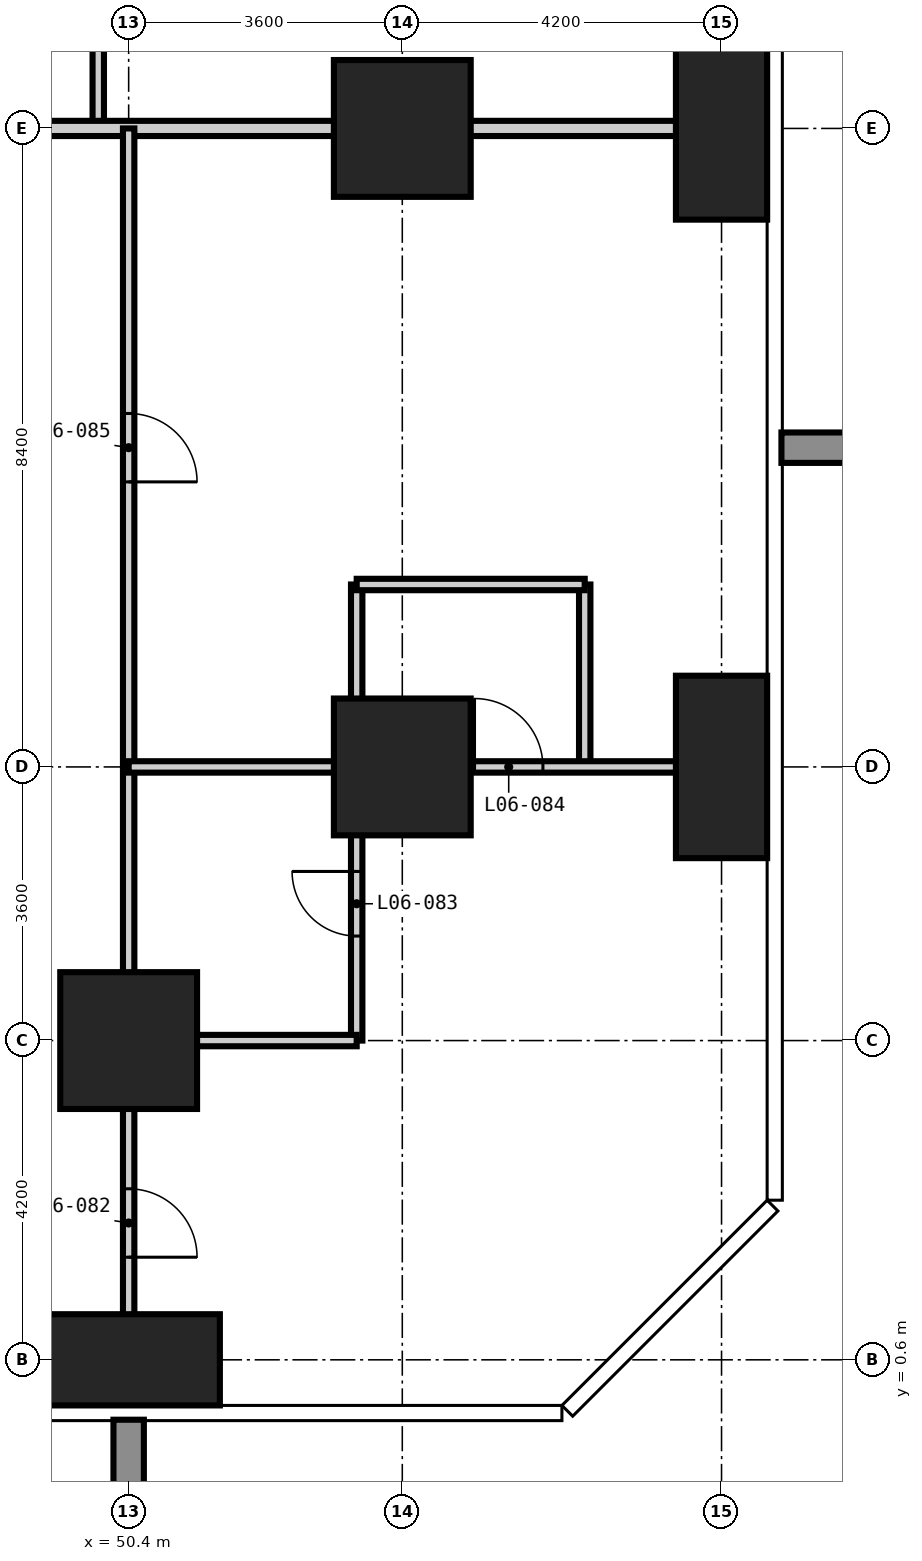
"""IFC4 building model, lengths in metres.
Left out: names, types, materials, properties, quantities, classifications, styles, units other than length and angle.
Written with IfcOpenShell. Run it as: python <this file> out.ifc"""

import sys

from ifc_helpers import new_model, si_unit, direction, frame, frame_2d, origin, origin_2d, place, context, subcontext, project, spatial, rectangle, extrude, element, fill, save


model = new_model("IFC4")
c1 = context("Model", 3, precision=1e-05, world=origin(), true_north=direction((0.0, 1.0)))
c2 = subcontext(c1, "Body", "Model", "MODEL_VIEW")
j1 = project(units=[si_unit("LENGTHUNIT", "METRE"), si_unit("PLANEANGLEUNIT", "RADIAN")], contexts=[c1])
p1 = place(None, origin())
s1 = spatial("IfcSite", under=j1, at=p1, CompositionType="ELEMENT")
p2 = place(p1, origin())
s2 = spatial("IfcBuilding", under=s1, at=p2, CompositionType="ELEMENT")
p3 = place(p2, frame((0.0, 0.0, 30.6)))
s3 = spatial("IfcBuildingStorey", under=s2, at=p3, CompositionType="ELEMENT", Elevation=30.6)
p4 = place(p3, frame((50.4, 0.6, -0.35), z_axis=(0.0, 0.0, 1.0), x_axis=(1.0, 0.0, 0.0)))
e1 = element("IfcColumn", 1, at=p4, inside=s3, PredefinedType="COLUMN", context=c2, shape_type="SweptSolid", body=[
    extrude(rectangle(XDim=2.4, YDim=1.2, at=origin_2d()), origin(), (0.0, 0.0, 1.0), 3.6),
])
for number, where, z_axis, x_axis in (
    (2, (50.4, 4.8, -0.35), (0.0, 0.0, 1.0), (1.0, 0.0, 0.0)),
    (3, (54.0, 8.4, -0.35), (0.0, 0.0, 1.0), (1.0, 0.0, 0.0)),
    (4, (54.0, 16.8, -0.35), (0.0, 0.0, 1.0), (1.0, 0.0, 0.0)),
):
    element("IfcColumn", number, at=place(p3, frame(where, z_axis=z_axis, x_axis=x_axis)), inside=s3, PredefinedType="COLUMN", context=c2, shape_type="SweptSolid", body=[
        extrude(rectangle(XDim=1.8, YDim=1.8, at=origin_2d()), origin(), (0.0, 0.0, 1.0), 3.6),
    ])
for number, where, z_axis, x_axis in (
    (5, (58.2, 8.4, -0.35), (0.0, 0.0, 1.0), (1.0, 0.0, 0.0)),
    (6, (58.2, 16.8, -0.35), (0.0, 0.0, 1.0), (1.0, 0.0, 0.0)),
):
    element("IfcColumn", number, at=place(p3, frame(where, z_axis=z_axis, x_axis=x_axis)), inside=s3, PredefinedType="COLUMN", context=c2, shape_type="SweptSolid", body=[
        extrude(rectangle(XDim=1.2, YDim=2.4, at=origin_2d()), origin(), (0.0, 0.0, 1.0), 3.6),
    ])
p5 = place(p3, frame((50.0, 16.8, 0.0), z_axis=(0.0, 0.0, 1.0), x_axis=(0.0, 1.0, 0.0)))
e7 = element("IfcWall", 7, at=p5, inside=s3, PredefinedType="PARTITIONING", context=c2, shape_type="SweptSolid", body=[
    extrude(rectangle(XDim=2.7, YDim=0.15, at=frame_2d((1.35, 0.0))), origin(), (0.0, 0.0, 1.0), 3.25),
])
p6 = place(p3, frame((53.4, 4.8, 0.0), z_axis=(0.0, 0.0, 1.0), x_axis=(0.0, 1.0, 0.0)))
e8 = element("IfcWall", 8, at=p6, inside=s3, PredefinedType="PARTITIONING", context=c2, shape_type="SweptSolid", body=[
    extrude(rectangle(XDim=3.6, YDim=0.15, at=frame_2d((1.8, 0.0))), origin(), (0.0, 0.0, 1.0), 3.25),
])
p7 = place(p6, frame((1.375, 0.0, 0.0)))
e9 = element("IfcOpeningElement", 9, at=p7, cuts=e8, PredefinedType="OPENING", context=c2, shape_type="SweptSolid", body=[
    extrude(rectangle(XDim=0.85, YDim=2.1, at=frame_2d((0.425, 1.05))), frame((0.0, 0.085, 0.0), z_axis=(0.0, -1.0, 0.0), x_axis=(1.0, 0.0, 0.0)), (0.0, 0.0, 1.0), 0.17),
])
p8 = place(p3, frame((50.4, 4.8, 0.0), z_axis=(0.0, 0.0, 1.0), x_axis=(1.0, 0.0, 0.0)))
e10 = element("IfcWall", 10, at=p8, inside=s3, PredefinedType="PARTITIONING", context=c2, shape_type="SweptSolid", body=[
    extrude(rectangle(XDim=3.0, YDim=0.15, at=frame_2d((1.5, 0.0))), origin(), (0.0, 0.0, 1.0), 3.25),
])
p9 = place(p3, frame((45.5, 16.8, 0.0), z_axis=(0.0, 0.0, 1.0), x_axis=(1.0, 0.0, 0.0)))
e11 = element("IfcWall", 11, at=p9, inside=s3, PredefinedType="PARTITIONING", context=c2, shape_type="SweptSolid", body=[
    extrude(rectangle(XDim=13.308, YDim=0.2, at=frame_2d((6.654, 0.0))), origin(), (0.0, 0.0, 1.0), 3.25),
])
p10 = place(p3, frame((50.4, -0.008, 0.0), z_axis=(0.0, 0.0, 1.0), x_axis=(0.0, 1.0, 0.0)))
e12 = element("IfcWall", 12, at=p10, inside=s3, PredefinedType="PARTITIONING", context=c2, shape_type="SweptSolid", body=[
    extrude(rectangle(XDim=16.808, YDim=0.15, at=frame_2d((8.404, 0.0))), origin(), (0.0, 0.0, 1.0), 3.25),
])
p11 = place(p10, frame((1.958, 0.0, 0.0)))
e13 = element("IfcOpeningElement", 13, at=p11, cuts=e12, PredefinedType="OPENING", context=c2, shape_type="SweptSolid", body=[
    extrude(rectangle(XDim=0.9, YDim=2.1, at=frame_2d((0.45, 1.05))), frame((0.0, 0.085, 0.0), z_axis=(0.0, -1.0, 0.0), x_axis=(1.0, 0.0, 0.0)), (0.0, 0.0, 1.0), 0.17),
])
p12 = place(p10, frame((12.158, 0.0, 0.0)))
e14 = element("IfcOpeningElement", 14, at=p12, cuts=e12, PredefinedType="OPENING", context=c2, shape_type="SweptSolid", body=[
    extrude(rectangle(XDim=0.9, YDim=2.1, at=frame_2d((0.45, 1.05))), frame((0.0, 0.085, 0.0), z_axis=(0.0, -1.0, 0.0), x_axis=(1.0, 0.0, 0.0)), (0.0, 0.0, 1.0), 0.17),
])
for number, where, z_axis, x_axis in (
    (15, (53.4, 8.4, 0.0), (0.0, 0.0, 1.0), (0.0, 1.0, 0.0)),
    (16, (56.4, 8.4, 0.0), (0.0, 0.0, 1.0), (0.0, 1.0, 0.0)),
):
    element("IfcWall", number, at=place(p3, frame(where, z_axis=z_axis, x_axis=x_axis)), inside=s3, PredefinedType="PARTITIONING", context=c2, shape_type="SweptSolid", body=[
        extrude(rectangle(XDim=2.4, YDim=0.15, at=frame_2d((1.2, 0.0))), origin(), (0.0, 0.0, 1.0), 3.25),
    ])
p13 = place(p3, frame((50.4, 8.4, 0.0), z_axis=(0.0, 0.0, 1.0), x_axis=(1.0, 0.0, 0.0)))
e17 = element("IfcWall", 17, at=p13, inside=s3, PredefinedType="PARTITIONING", context=c2, shape_type="SweptSolid", body=[
    extrude(rectangle(XDim=8.408, YDim=0.15, at=frame_2d((4.204, 0.0))), origin(), (0.0, 0.0, 1.0), 3.25),
])
p14 = place(p13, frame((4.55, 0.0, 0.0)))
e18 = element("IfcOpeningElement", 18, at=p14, cuts=e17, PredefinedType="OPENING", context=c2, shape_type="SweptSolid", body=[
    extrude(rectangle(XDim=0.9, YDim=2.1, at=frame_2d((0.45, 1.05))), frame((0.0, 0.085, 0.0), z_axis=(0.0, -1.0, 0.0), x_axis=(1.0, 0.0, 0.0)), (0.0, 0.0, 1.0), 0.17),
])
p15 = place(p3, frame((53.4, 10.8, 0.0), z_axis=(0.0, 0.0, 1.0), x_axis=(1.0, 0.0, 0.0)))
e19 = element("IfcWall", 19, at=p15, inside=s3, PredefinedType="PARTITIONING", context=c2, shape_type="SweptSolid", body=[
    extrude(rectangle(XDim=3.0, YDim=0.15, at=frame_2d((1.5, 0.0))), origin(), (0.0, 0.0, 1.0), 3.25),
])
p16 = place(p11, frame((0.9, 0.0, 0.0), z_axis=(0.0, 0.0, 1.0), x_axis=(-1.0, 0.0, 0.0)))
e20 = element("IfcDoor", 20, at=p16, inside=s3, OperationType="SINGLE_SWING_RIGHT", PredefinedType="DOOR", context=c2, shape_type="SweptSolid", body=[
    extrude(rectangle(XDim=0.9, YDim=2.1, at=frame_2d((0.45, 1.05))), frame((0.0, 0.025, 0.0), z_axis=(0.0, -1.0, 0.0), x_axis=(1.0, 0.0, 0.0)), (0.0, 0.0, 1.0), 0.05),
])
fill(e13, e20)
p17 = place(p7, origin())
e21 = element("IfcDoor", 21, at=p17, inside=s3, OperationType="SINGLE_SWING_RIGHT", PredefinedType="DOOR", context=c2, shape_type="SweptSolid", body=[
    extrude(rectangle(XDim=0.85, YDim=2.1, at=frame_2d((0.425, 1.05))), frame((0.0, 0.025, 0.0), z_axis=(0.0, -1.0, 0.0), x_axis=(1.0, 0.0, 0.0)), (0.0, 0.0, 1.0), 0.05),
])
fill(e9, e21)
p18 = place(p14, origin())
e22 = element("IfcDoor", 22, at=p18, inside=s3, OperationType="SINGLE_SWING_LEFT", PredefinedType="DOOR", context=c2, shape_type="SweptSolid", body=[
    extrude(rectangle(XDim=0.9, YDim=2.1, at=frame_2d((0.45, 1.05))), frame((0.0, 0.025, 0.0), z_axis=(0.0, -1.0, 0.0), x_axis=(1.0, 0.0, 0.0)), (0.0, 0.0, 1.0), 0.05),
])
fill(e18, e22)
p19 = place(p12, frame((0.9, 0.0, 0.0), z_axis=(0.0, 0.0, 1.0), x_axis=(-1.0, 0.0, 0.0)))
e23 = element("IfcDoor", 23, at=p19, inside=s3, OperationType="SINGLE_SWING_RIGHT", PredefinedType="DOOR", context=c2, shape_type="SweptSolid", body=[
    extrude(rectangle(XDim=0.9, YDim=2.1, at=frame_2d((0.45, 1.05))), frame((0.0, 0.025, 0.0), z_axis=(0.0, -1.0, 0.0), x_axis=(1.0, 0.0, 0.0)), (0.0, 0.0, 1.0), 0.05),
])
fill(e14, e23)
save(model, sys.argv[1])
